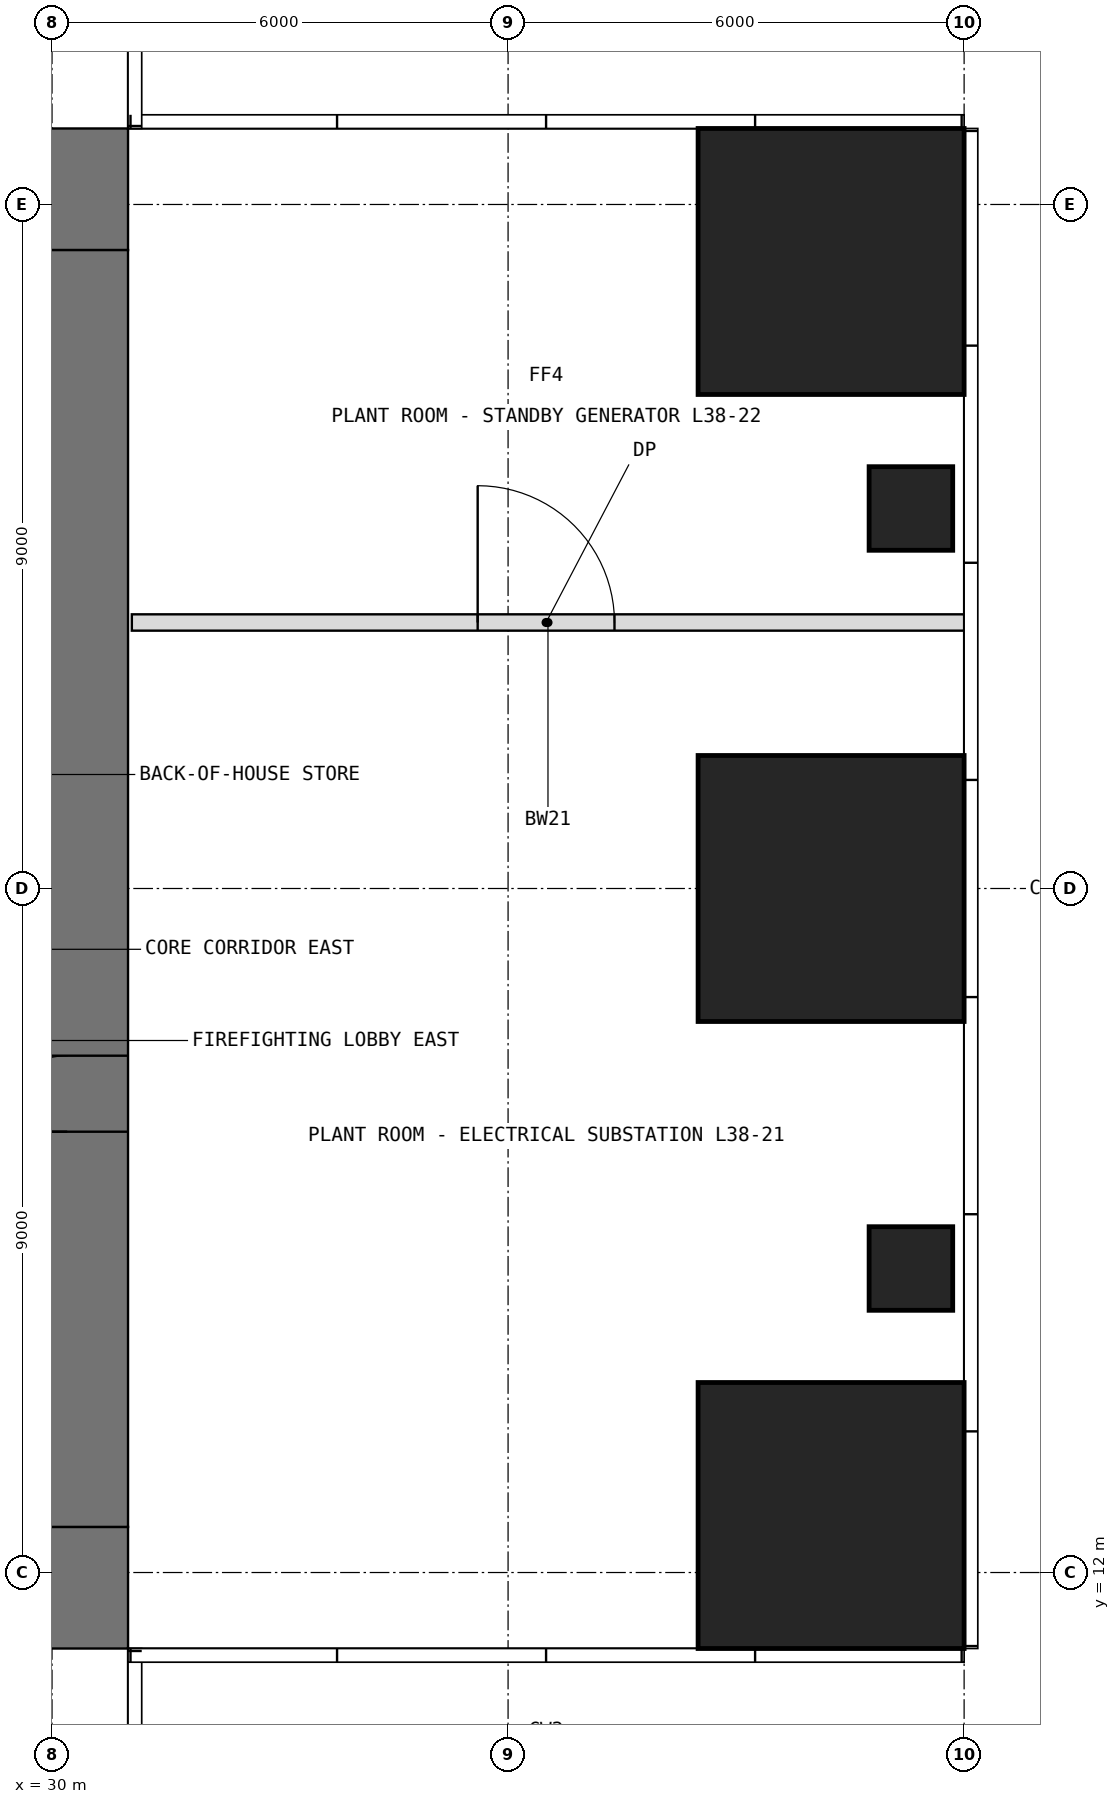
"""IFC4 building model, lengths in metres.
Left out: names, types, materials, properties, quantities, classifications, styles, units other than length and angle.
Written with IfcOpenShell. Run it as: python <this file> out.ifc"""

import sys

from ifc_helpers import new_model, si_unit, direction, frame, frame_2d, origin, origin_2d, place, context, subcontext, project, spatial, rectangle, extrude, element, fill, save


model = new_model("IFC4")
c1 = context("Model", 3, precision=1e-05, world=origin(), true_north=direction((0.0, 1.0)))
c2 = subcontext(c1, "Body", "Model", "MODEL_VIEW")
j1 = project(units=[si_unit("LENGTHUNIT", "METRE"), si_unit("PLANEANGLEUNIT", "RADIAN")], contexts=[c1])
p1 = place(None, origin())
s1 = spatial("IfcSite", under=j1, at=p1, CompositionType="ELEMENT")
p2 = place(p1, origin())
s2 = spatial("IfcBuilding", under=s1, at=p2, CompositionType="ELEMENT")
p3 = place(p2, frame((0.0, 0.0, 160.5)))
s3 = spatial("IfcBuildingStorey", under=s2, at=p3, CompositionType="ELEMENT", Elevation=160.5)
p4 = place(p3, frame((40.25, 12.75, 0.0), z_axis=(0.0, 0.0, 1.0), x_axis=(1.0, 0.0, 0.0)))
e1 = element("IfcColumn", 1, at=p4, inside=s3, PredefinedType="COLUMN", context=c2, shape_type="SweptSolid", body=[
    extrude(rectangle(XDim=3.5, YDim=3.5, at=origin_2d()), origin(), (0.0, 0.0, 1.0), 5.0),
])
p5 = place(p3, frame((41.3, 16.0, 0.0), z_axis=(0.0, 0.0, 1.0), x_axis=(1.0, 0.0, 0.0)))
e2 = element("IfcColumn", 2, at=p5, inside=s3, PredefinedType="COLUMN", context=c2, shape_type="SweptSolid", body=[
    extrude(rectangle(XDim=1.1, YDim=1.1, at=origin_2d()), origin(), (0.0, 0.0, 1.0), 5.0),
])
p6 = place(p3, frame((40.25, 21.0, 0.0), z_axis=(0.0, 0.0, 1.0), x_axis=(1.0, 0.0, 0.0)))
e3 = element("IfcColumn", 3, at=p6, inside=s3, PredefinedType="COLUMN", context=c2, shape_type="SweptSolid", body=[
    extrude(rectangle(XDim=3.5, YDim=3.5, at=origin_2d()), origin(), (0.0, 0.0, 1.0), 5.0),
])
p7 = place(p3, frame((41.3, 26.0, 0.0), z_axis=(0.0, 0.0, 1.0), x_axis=(1.0, 0.0, 0.0)))
e4 = element("IfcColumn", 4, at=p7, inside=s3, PredefinedType="COLUMN", context=c2, shape_type="SweptSolid", body=[
    extrude(rectangle(XDim=1.1, YDim=1.1, at=origin_2d()), origin(), (0.0, 0.0, 1.0), 5.0),
])
p8 = place(p3, frame((40.25, 29.25, 0.0), z_axis=(0.0, 0.0, 1.0), x_axis=(1.0, 0.0, 0.0)))
e5 = element("IfcColumn", 5, at=p8, inside=s3, PredefinedType="COLUMN", context=c2, shape_type="SweptSolid", body=[
    extrude(rectangle(XDim=3.5, YDim=3.5, at=origin_2d()), origin(), (0.0, 0.0, 1.0), 5.0),
])
p9 = place(p3, frame((11.0, 11.8, -0.25), z_axis=(0.0, 0.0, 1.0), x_axis=(1.0, 0.0, 0.0)))
e6 = element("IfcWall", 6, at=p9, inside=s3, PredefinedType="SHEAR", context=c2, shape_type="SweptSolid", body=[
    extrude(rectangle(XDim=20.0, YDim=1.6, at=frame_2d((10.0, 0.0))), origin(), (0.0, 0.0, 1.0), 5.2),
])
p10 = place(p9, frame((12.925, 0.0, 0.25)))
e7 = element("IfcOpeningElement", 7, at=p10, cuts=e6, PredefinedType="OPENING", context=c2, shape_type="SweptSolid", body=[
    extrude(rectangle(XDim=0.95, YDim=2.4, at=frame_2d((0.475, 1.2))), frame((0.0, 0.81, 0.0), z_axis=(0.0, -1.0, 0.0), x_axis=(1.0, 0.0, 0.0)), (0.0, 0.0, 1.0), 1.62),
])
p11 = place(p3, frame((11.0, 30.2, -0.25), z_axis=(0.0, 0.0, 1.0), x_axis=(1.0, 0.0, 0.0)))
e8 = element("IfcWall", 8, at=p11, inside=s3, PredefinedType="SHEAR", context=c2, shape_type="SweptSolid", body=[
    extrude(rectangle(XDim=20.0, YDim=1.6, at=frame_2d((10.0, 0.0))), origin(), (0.0, 0.0, 1.0), 5.2),
])
p12 = place(p11, frame((6.125, 0.0, 0.25)))
e9 = element("IfcOpeningElement", 9, at=p12, cuts=e8, PredefinedType="OPENING", context=c2, shape_type="SweptSolid", body=[
    extrude(rectangle(XDim=0.95, YDim=2.4, at=frame_2d((0.475, 1.2))), frame((0.0, 0.81, 0.0), z_axis=(0.0, -1.0, 0.0), x_axis=(1.0, 0.0, 0.0)), (0.0, 0.0, 1.0), 1.62),
])
p13 = place(p3, frame((30.2, 12.6, -0.25), z_axis=(0.0, 0.0, 1.0), x_axis=(0.0, 1.0, 0.0)))
e10 = element("IfcWall", 10, at=p13, inside=s3, PredefinedType="SHEAR", context=c2, shape_type="SweptSolid", body=[
    extrude(rectangle(XDim=16.8, YDim=1.6, at=frame_2d((8.4, 0.0))), origin(), (0.0, 0.0, 1.0), 5.2),
])
p14 = place(p13, frame((5.2, 0.0, 0.25)))
e11 = element("IfcOpeningElement", 11, at=p14, cuts=e10, PredefinedType="OPENING", context=c2, shape_type="SweptSolid", body=[
    extrude(rectangle(XDim=1.0, YDim=2.2, at=frame_2d((0.5, 1.1))), frame((0.0, 0.81, 0.0), z_axis=(0.0, -1.0, 0.0), x_axis=(1.0, 0.0, 0.0)), (0.0, 0.0, 1.0), 1.62),
])
p15 = place(p3, frame((31.05, 24.5, 0.0), z_axis=(0.0, 0.0, 1.0), x_axis=(1.0, 0.0, 0.0)))
e12 = element("IfcWall", 12, at=p15, inside=s3, PredefinedType="PARTITIONING", context=c2, shape_type="SweptSolid", body=[
    extrude(rectangle(XDim=10.95, YDim=0.215, at=frame_2d((5.475, 0.0))), origin(), (0.0, 0.0, 1.0), 4.75),
])
p16 = place(p15, frame((4.55, 0.0, 0.0)))
e13 = element("IfcOpeningElement", 13, at=p16, cuts=e12, PredefinedType="OPENING", context=c2, shape_type="SweptSolid", body=[
    extrude(rectangle(XDim=1.8, YDim=2.4, at=frame_2d((0.9, 1.2))), frame((0.0, 0.118, 0.0), z_axis=(0.0, -1.0, 0.0), x_axis=(1.0, 0.0, 0.0)), (0.0, 0.0, 1.0), 0.235),
])
p17 = place(p14, origin())
e14 = element("IfcDoor", 14, at=p17, inside=s3, OperationType="SINGLE_SWING_LEFT", PredefinedType="DOOR", context=c2, shape_type="SweptSolid", body=[
    extrude(rectangle(XDim=1.0, YDim=2.2, at=frame_2d((0.5, 1.1))), frame((0.0, -0.075, 0.0), z_axis=(0.0, -1.0, 0.0), x_axis=(1.0, 0.0, 0.0)), (0.0, 0.0, 1.0), 0.05),
])
fill(e11, e14)
p18 = place(p16, origin())
e15 = element("IfcDoor", 15, at=p18, inside=s3, OperationType="DOUBLE_DOOR_SINGLE_SWING", PredefinedType="DOOR", context=c2, shape_type="SweptSolid", body=[
    extrude(rectangle(XDim=1.8, YDim=2.4, at=frame_2d((0.9, 1.2))), frame((0.0, 0.025, 0.0), z_axis=(0.0, -1.0, 0.0), x_axis=(1.0, 0.0, 0.0)), (0.0, 0.0, 1.0), 0.05),
])
fill(e13, e15)
save(model, sys.argv[1])
